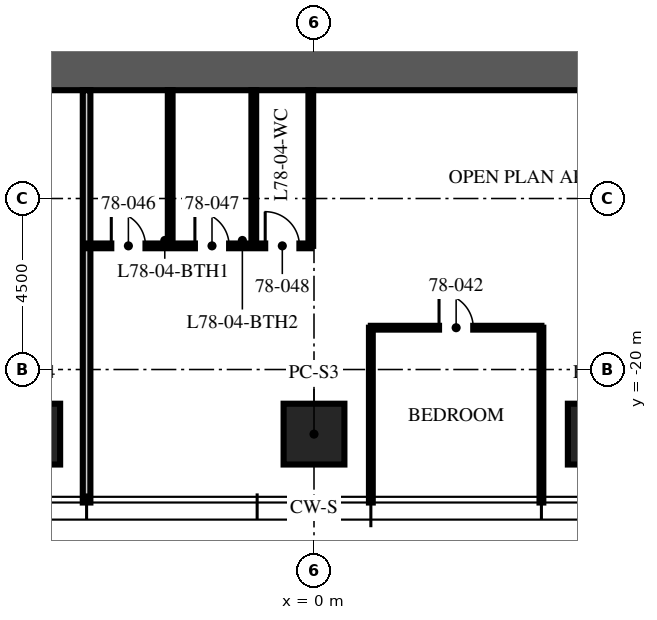
"""IFC4 building model, lengths in metres.
Left out: names, types, materials, properties, quantities, classifications, styles, units other than length and angle.
Written with IfcOpenShell. Run it as: python <this file> out.ifc"""

import sys

from ifc_helpers import new_model, si_unit, direction, frame, frame_2d, origin, origin_2d, place, context, subcontext, project, spatial, rectangle, extrude, element, fill, save


model = new_model("IFC4")
c1 = context("Model", 3, precision=1e-05, world=origin(), true_north=direction((0.0, 1.0)))
c2 = subcontext(c1, "Body", "Model", "MODEL_VIEW")
j1 = project(units=[si_unit("LENGTHUNIT", "METRE"), si_unit("PLANEANGLEUNIT", "RADIAN")], contexts=[c1])
p1 = place(None, origin())
s1 = spatial("IfcSite", under=j1, at=p1, CompositionType="ELEMENT")
p2 = place(p1, origin())
s2 = spatial("IfcBuilding", under=s1, at=p2, CompositionType="ELEMENT")
p3 = place(p2, frame((0.0, 0.0, 312.0)))
s3 = spatial("IfcBuildingStorey", under=s2, at=p3, CompositionType="ELEMENT", Elevation=312.0)
p4 = place(p3, frame((-15.5, -12.0, -0.25), z_axis=(0.0, 0.0, 1.0), x_axis=(1.0, 0.0, 0.0)))
e1 = element("IfcWall", 1, at=p4, inside=s3, PredefinedType="SHEAR", context=c2, shape_type="SweptSolid", body=[
    extrude(rectangle(XDim=31.0, YDim=1.3, at=frame_2d((15.5, 0.0))), origin(), (0.0, 0.0, 1.0), 3.75),
])
for number, where, z_axis, x_axis in (
    (2, (7.48, -21.7, 0.0), (0.0, 0.0, 1.0), (1.0, 0.0, 0.0)),
    (3, (0.0, -21.7, 0.0), (0.0, 0.0, 1.0), (1.0, 0.0, 0.0)),
    (4, (-7.48, -21.7, 0.0), (0.0, 0.0, 1.0), (1.0, 0.0, 0.0)),
):
    element("IfcColumn", number, at=place(p3, frame(where, z_axis=z_axis, x_axis=x_axis)), inside=s3, PredefinedType="COLUMN", context=c2, shape_type="SweptSolid", body=[
        extrude(rectangle(XDim=1.6, YDim=1.6, at=origin_2d()), origin(), (0.0, 0.0, 1.0), 3.75),
    ])
p5 = place(p3, frame((-5.984, -12.65, 0.0), z_axis=(0.0, 0.0, 1.0), x_axis=(0.0, -1.0, 0.0)))
e5 = element("IfcWall", 5, at=p5, inside=s3, PredefinedType="PARTITIONING", context=c2, shape_type="SweptSolid", body=[
    extrude(rectangle(XDim=10.85, YDim=0.2, at=frame_2d((5.425, 0.0))), origin(), (0.0, 0.0, 1.0), 3.01),
])
for number, where, z_axis, x_axis in (
    (6, (1.496, -18.9, 0.0), (0.0, 0.0, 1.0), (0.0, -1.0, 0.0)),
    (7, (5.984, -18.9, 0.0), (0.0, 0.0, 1.0), (0.0, -1.0, 0.0)),
):
    element("IfcWall", number, at=place(p3, frame(where, z_axis=z_axis, x_axis=x_axis)), inside=s3, PredefinedType="PARTITIONING", context=c2, shape_type="SweptSolid", body=[
        extrude(rectangle(XDim=4.6, YDim=0.1, at=frame_2d((2.3, 0.0))), origin(), (0.0, 0.0, 1.0), 3.01),
    ])
p6 = place(p3, frame((1.496, -18.9, 0.0), z_axis=(0.0, 0.0, 1.0), x_axis=(1.0, 0.0, 0.0)))
e8 = element("IfcWall", 8, at=p6, inside=s3, PredefinedType="PARTITIONING", context=c2, shape_type="SweptSolid", body=[
    extrude(rectangle(XDim=4.488, YDim=0.1, at=frame_2d((2.244, 0.0))), origin(), (0.0, 0.0, 1.0), 2.91),
])
p7 = place(p6, frame((1.794, 0.0, 0.0)))
e9 = element("IfcOpeningElement", 9, at=p7, cuts=e8, PredefinedType="OPENING", context=c2, shape_type="SweptSolid", body=[
    extrude(rectangle(XDim=0.9, YDim=2.1, at=frame_2d((0.45, 1.05))), frame((0.0, 0.06, 0.0), z_axis=(0.0, -1.0, 0.0), x_axis=(1.0, 0.0, 0.0)), (0.0, 0.0, 1.0), 0.12),
])
p8 = place(p3, frame((-5.984, -16.746, 0.0), z_axis=(0.0, 0.0, 1.0), x_axis=(1.0, 0.0, 0.0)))
e10 = element("IfcWall", 10, at=p8, inside=s3, PredefinedType="PARTITIONING", context=c2, shape_type="SweptSolid", body=[
    extrude(rectangle(XDim=5.9, YDim=0.125, at=frame_2d((2.95, 0.0))), origin(), (0.0, 0.0, 1.0), 2.9),
])
p9 = place(p8, frame((0.65, 0.0, 0.0)))
e11 = element("IfcOpeningElement", 11, at=p9, cuts=e10, PredefinedType="OPENING", context=c2, shape_type="SweptSolid", body=[
    extrude(rectangle(XDim=0.9, YDim=2.1, at=frame_2d((0.45, 1.05))), frame((0.0, 0.073, 0.0), z_axis=(0.0, -1.0, 0.0), x_axis=(1.0, 0.0, 0.0)), (0.0, 0.0, 1.0), 0.145),
])
p10 = place(p8, frame((2.85, 0.0, 0.0)))
e12 = element("IfcOpeningElement", 12, at=p10, cuts=e10, PredefinedType="OPENING", context=c2, shape_type="SweptSolid", body=[
    extrude(rectangle(XDim=0.9, YDim=2.1, at=frame_2d((0.45, 1.05))), frame((0.0, 0.073, 0.0), z_axis=(0.0, -1.0, 0.0), x_axis=(1.0, 0.0, 0.0)), (0.0, 0.0, 1.0), 0.145),
])
p11 = place(p8, frame((4.7, 0.0, 0.0)))
e13 = element("IfcOpeningElement", 13, at=p11, cuts=e10, PredefinedType="OPENING", context=c2, shape_type="SweptSolid", body=[
    extrude(rectangle(XDim=0.9, YDim=2.1, at=frame_2d((0.45, 1.05))), frame((0.0, 0.073, 0.0), z_axis=(0.0, -1.0, 0.0), x_axis=(1.0, 0.0, 0.0)), (0.0, 0.0, 1.0), 0.145),
])
p12 = place(p3, frame((-3.784, -12.65, 0.0), z_axis=(0.0, 0.0, 1.0), x_axis=(0.0, -1.0, 0.0)))
e14 = element("IfcWall", 14, at=p12, inside=s3, PredefinedType="PARTITIONING", context=c2, shape_type="SweptSolid", body=[
    extrude(rectangle(XDim=4.096, YDim=0.125, at=frame_2d((2.048, 0.0))), origin(), (0.0, 0.0, 1.0), 2.91),
])
p13 = place(p3, frame((-1.584, -12.65, 0.0), z_axis=(0.0, 0.0, 1.0), x_axis=(0.0, -1.0, 0.0)))
e15 = element("IfcWall", 15, at=p13, inside=s3, PredefinedType="PARTITIONING", context=c2, shape_type="SweptSolid", body=[
    extrude(rectangle(XDim=4.096, YDim=0.125, at=frame_2d((2.048, 0.0))), origin(), (0.0, 0.0, 1.0), 3.5),
])
p14 = place(p3, frame((-0.084, -12.65, 0.0), z_axis=(0.0, 0.0, 1.0), x_axis=(0.0, -1.0, 0.0)))
e16 = element("IfcWall", 16, at=p14, inside=s3, PredefinedType="PARTITIONING", context=c2, shape_type="SweptSolid", body=[
    extrude(rectangle(XDim=4.096, YDim=0.125, at=frame_2d((2.048, 0.0))), origin(), (0.0, 0.0, 1.0), 2.9),
])
p15 = place(p7, origin())
e17 = element("IfcDoor", 17, at=p15, inside=s3, OperationType="SINGLE_SWING_LEFT", PredefinedType="DOOR", context=c2, shape_type="SweptSolid", body=[
    extrude(rectangle(XDim=0.9, YDim=2.1, at=frame_2d((0.45, 1.05))), frame((0.0, 0.025, 0.0), z_axis=(0.0, -1.0, 0.0), x_axis=(1.0, 0.0, 0.0)), (0.0, 0.0, 1.0), 0.05),
])
fill(e9, e17)
p16 = place(p9, origin())
e18 = element("IfcDoor", 18, at=p16, inside=s3, OperationType="SINGLE_SWING_LEFT", PredefinedType="DOOR", context=c2, shape_type="SweptSolid", body=[
    extrude(rectangle(XDim=0.9, YDim=2.1, at=frame_2d((0.45, 1.05))), frame((0.0, 0.025, 0.0), z_axis=(0.0, -1.0, 0.0), x_axis=(1.0, 0.0, 0.0)), (0.0, 0.0, 1.0), 0.05),
])
fill(e11, e18)
p17 = place(p10, origin())
e19 = element("IfcDoor", 19, at=p17, inside=s3, OperationType="SINGLE_SWING_LEFT", PredefinedType="DOOR", context=c2, shape_type="SweptSolid", body=[
    extrude(rectangle(XDim=0.9, YDim=2.1, at=frame_2d((0.45, 1.05))), frame((0.0, 0.025, 0.0), z_axis=(0.0, -1.0, 0.0), x_axis=(1.0, 0.0, 0.0)), (0.0, 0.0, 1.0), 0.05),
])
fill(e12, e19)
p18 = place(p11, origin())
e20 = element("IfcDoor", 20, at=p18, inside=s3, OperationType="SINGLE_SWING_LEFT", PredefinedType="DOOR", context=c2, shape_type="SweptSolid", body=[
    extrude(rectangle(XDim=0.9, YDim=2.1, at=frame_2d((0.45, 1.05))), frame((0.0, 0.025, 0.0), z_axis=(0.0, -1.0, 0.0), x_axis=(1.0, 0.0, 0.0)), (0.0, 0.0, 1.0), 0.05),
])
fill(e13, e20)
save(model, sys.argv[1])
